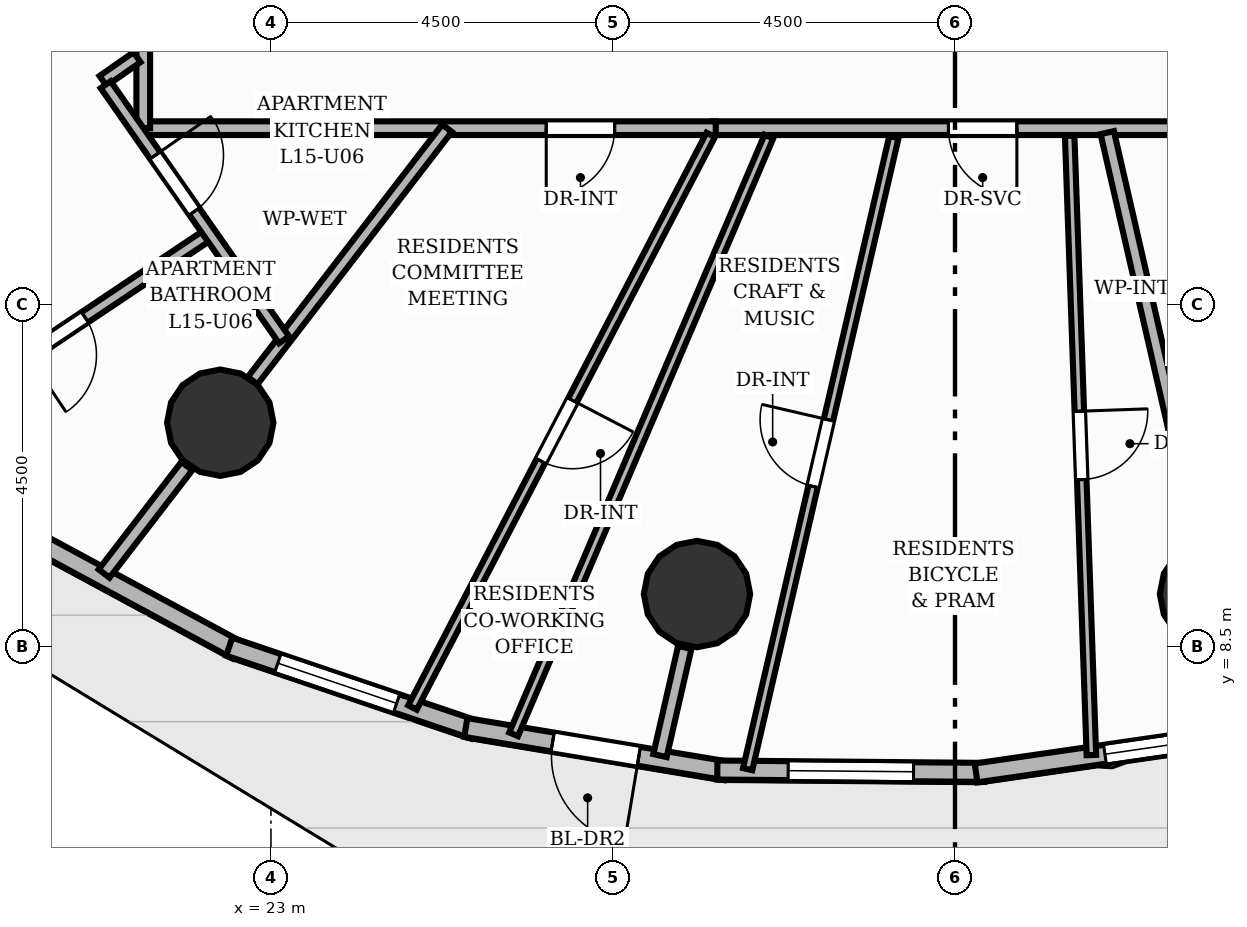
"""IFC4 building model, lengths in metres.
Left out: names, types, materials, properties, quantities, classifications, styles, units other than length and angle.
Written with IfcOpenShell. Run it as: python <this file> out.ifc"""

import sys

from ifc_helpers import new_model, si_unit, direction, frame, frame_2d, origin, origin_2d, place, context, subcontext, project, spatial, rectangle, circle, extrude, element, fill, save


model = new_model("IFC4")
c1 = context("Model", 3, precision=1e-05, world=origin(), true_north=direction((0.0, 1.0)))
c2 = subcontext(c1, "Body", "Model", "MODEL_VIEW")
j1 = project(units=[si_unit("LENGTHUNIT", "METRE"), si_unit("PLANEANGLEUNIT", "RADIAN")], contexts=[c1])
p1 = place(None, origin())
s1 = spatial("IfcSite", under=j1, at=p1, CompositionType="ELEMENT")
p2 = place(p1, origin())
s2 = spatial("IfcBuilding", under=s1, at=p2, CompositionType="ELEMENT")
p3 = place(p2, frame((0.0, 0.0, 53.6)))
s3 = spatial("IfcBuildingStorey", under=s2, at=p3, CompositionType="ELEMENT", Elevation=53.6)
for number, where, z_axis, x_axis in (
    (1, (22.333, 11.445, 0.0), (0.0, 0.0, 1.0), (1.0, 0.0, 0.0)),
    (2, (28.605, 9.19, 0.0), (0.0, 0.0, 1.0), (1.0, 0.0, 0.0)),
    (3, (35.395, 9.19, 0.0), (0.0, 0.0, 1.0), (1.0, 0.0, 0.0)),
):
    element("IfcColumn", number, at=place(p3, frame(where, z_axis=z_axis, x_axis=x_axis)), inside=s3, PredefinedType="COLUMN", context=c2, shape_type="SweptSolid", body=[
        extrude(circle(Radius=0.7, at=origin_2d()), origin(), (0.0, 0.0, 1.0), 3.2),
    ])
p4 = place(p3, frame((22.552, 8.454, 0.0), z_axis=(0.0, 0.0, 1.0), x_axis=(-0.879811992908, 0.475321845843, 0.0)))
e4 = element("IfcWall", 4, at=p4, inside=s3, PredefinedType="SOLIDWALL", context=c2, shape_type="SweptSolid", body=[
    extrude(rectangle(XDim=3.323, YDim=0.25, at=frame_2d((1.661, 0.0))), origin(), (0.0, 0.0, 1.0), 2.96),
])
p5 = place(p3, frame((25.67, 7.407, 0.0), z_axis=(0.0, 0.0, 1.0), x_axis=(-0.947149503871, 0.320792483262, 0.0)))
e5 = element("IfcWall", 5, at=p5, inside=s3, PredefinedType="SOLIDWALL", context=c2, shape_type="SweptSolid", body=[
    extrude(rectangle(XDim=3.399, YDim=0.25, at=frame_2d((1.699, 0.0))), origin(), (0.0, 0.0, 1.0), 2.96),
])
p6 = place(p5, frame((1.074, 0.0, 0.85)))
e6 = element("IfcOpeningElement", 6, at=p6, cuts=e5, PredefinedType="OPENING", context=c2, shape_type="SweptSolid", body=[
    extrude(rectangle(XDim=1.65, YDim=1.55, at=frame_2d((0.825, 0.775))), frame((0.0, 0.135, 0.0), z_axis=(0.0, -1.0, 0.0), x_axis=(1.0, 0.0, 0.0)), (0.0, 0.0, 1.0), 0.27),
])
p7 = place(p3, frame((28.982, 6.865, 0.0), z_axis=(0.0, 0.0, 1.0), x_axis=(-0.986430084323, 0.164181877025, 0.0)))
e7 = element("IfcWall", 7, at=p7, inside=s3, PredefinedType="SOLIDWALL", context=c2, shape_type="SweptSolid", body=[
    extrude(rectangle(XDim=3.465, YDim=0.25, at=frame_2d((1.732, 0.0))), origin(), (0.0, 0.0, 1.0), 2.96),
])
p8 = place(p7, frame((1.157, 0.0, 0.0)))
e8 = element("IfcOpeningElement", 8, at=p8, cuts=e7, PredefinedType="OPENING", context=c2, shape_type="SweptSolid", body=[
    extrude(rectangle(XDim=1.15, YDim=2.01, at=frame_2d((0.575, 1.005))), frame((0.0, 0.135, 0.0), z_axis=(0.0, -1.0, 0.0), x_axis=(1.0, 0.0, 0.0)), (0.0, 0.0, 1.0), 0.27),
])
p9 = place(p3, frame((32.386, 6.844, 0.0), z_axis=(0.0, 0.0, 1.0), x_axis=(-0.999961046076, 0.008826456273, 0.0)))
e9 = element("IfcWall", 9, at=p9, inside=s3, PredefinedType="SOLIDWALL", context=c2, shape_type="SweptSolid", body=[
    extrude(rectangle(XDim=3.513, YDim=0.25, at=frame_2d((1.756, 0.0))), origin(), (0.0, 0.0, 1.0), 2.96),
])
p10 = place(p9, frame((0.931, 0.0, 0.85)))
e10 = element("IfcOpeningElement", 10, at=p10, cuts=e9, PredefinedType="OPENING", context=c2, shape_type="SweptSolid", body=[
    extrude(rectangle(XDim=1.65, YDim=1.55, at=frame_2d((0.825, 0.775))), frame((0.0, 0.135, 0.0), z_axis=(0.0, -1.0, 0.0), x_axis=(1.0, 0.0, 0.0)), (0.0, 0.0, 1.0), 0.27),
])
p11 = place(p3, frame((35.779, 7.344, 0.0), z_axis=(0.0, 0.0, 1.0), x_axis=(-0.989638017979, -0.143584795051, 0.0)))
e11 = element("IfcWall", 11, at=p11, inside=s3, PredefinedType="SOLIDWALL", context=c2, shape_type="SweptSolid", body=[
    extrude(rectangle(XDim=3.538, YDim=0.25, at=frame_2d((1.769, 0.0))), origin(), (0.0, 0.0, 1.0), 2.96),
])
p12 = place(p11, frame((0.175, 0.0, 0.85)))
e12 = element("IfcOpeningElement", 12, at=p12, cuts=e11, PredefinedType="OPENING", context=c2, shape_type="SweptSolid", body=[
    extrude(rectangle(XDim=1.65, YDim=1.29, at=frame_2d((0.825, 0.645))), frame((0.0, 0.135, 0.0), z_axis=(0.0, -1.0, 0.0), x_axis=(1.0, 0.0, 0.0)), (0.0, 0.0, 1.0), 0.27),
])
p13 = place(p3, frame((21.894, 10.874, 0.0), z_axis=(0.0, 0.0, 1.0), x_axis=(-0.61002145357, -0.792384897752, 0.0)))
e13 = element("IfcWall", 13, at=p13, inside=s3, PredefinedType="PARTITIONING", context=c2, shape_type="SweptSolid", body=[
    extrude(rectangle(XDim=1.785, YDim=0.18, at=frame_2d((0.892, 0.0))), origin(), (0.0, 0.0, 1.0), 2.178),
])
p14 = place(p3, frame((28.445, 8.488, 0.0), z_axis=(0.0, 0.0, 1.0), x_axis=(-0.223491959946, -0.974705772959, 0.0)))
e14 = element("IfcWall", 14, at=p14, inside=s3, PredefinedType="PARTITIONING", context=c2, shape_type="SweptSolid", body=[
    extrude(rectangle(XDim=1.46, YDim=0.18, at=frame_2d((0.73, 0.0))), origin(), (0.0, 0.0, 1.0), 2.178),
])
p15 = place(p3, frame((42.68, 15.32, 0.0), z_axis=(0.0, 0.0, 1.0), x_axis=(-1.0, 0.0, 0.0)))
e15 = element("IfcWall", 15, at=p15, inside=s3, PredefinedType="PARTITIONING", context=c2, shape_type="SweptSolid", body=[
    extrude(rectangle(XDim=13.87, YDim=0.18, at=frame_2d((6.935, 0.0))), origin(), (0.0, 0.0, 1.0), 2.955),
])
p16 = place(p15, frame((9.866, 0.0, 0.0)))
e16 = element("IfcOpeningElement", 16, at=p16, cuts=e15, PredefinedType="OPENING", context=c2, shape_type="SweptSolid", body=[
    extrude(rectangle(XDim=0.9, YDim=2.1, at=frame_2d((0.45, 1.05))), frame((0.0, 0.1, 0.0), z_axis=(0.0, -1.0, 0.0), x_axis=(1.0, 0.0, 0.0)), (0.0, 0.0, 1.0), 0.2),
])
p17 = place(p3, frame((28.852, 15.32, 0.0), z_axis=(0.0, 0.0, 1.0), x_axis=(-1.0, 0.0, 0.0)))
e17 = element("IfcWall", 17, at=p17, inside=s3, PredefinedType="PARTITIONING", context=c2, shape_type="SweptSolid", body=[
    extrude(rectangle(XDim=7.532, YDim=0.18, at=frame_2d((3.766, 0.0))), origin(), (0.0, 0.0, 1.0), 2.955),
])
p18 = place(p17, frame((1.33, 0.0, 0.0)))
e18 = element("IfcOpeningElement", 18, at=p18, cuts=e17, PredefinedType="OPENING", context=c2, shape_type="SweptSolid", body=[
    extrude(rectangle(XDim=0.9, YDim=2.1, at=frame_2d((0.45, 1.05))), frame((0.0, 0.1, 0.0), z_axis=(0.0, -1.0, 0.0), x_axis=(1.0, 0.0, 0.0)), (0.0, 0.0, 1.0), 0.2),
])
p19 = place(p3, frame((21.32, 15.32, 0.0), z_axis=(0.0, 0.0, 1.0), x_axis=(0.0, 1.0, 0.0)))
e19 = element("IfcWall", 19, at=p19, inside=s3, PredefinedType="PARTITIONING", context=c2, shape_type="SweptSolid", body=[
    extrude(rectangle(XDim=4.947, YDim=0.18, at=frame_2d((2.474, 0.0))), origin(), (0.0, 0.0, 1.0), 2.955),
])
p20 = place(p19, frame((2.432, 0.0, 0.0)))
e20 = element("IfcOpeningElement", 20, at=p20, cuts=e19, PredefinedType="OPENING", context=c2, shape_type="SweptSolid", body=[
    extrude(rectangle(XDim=1.05, YDim=2.15, at=frame_2d((0.525, 1.075))), frame((0.0, 0.1, 0.0), z_axis=(0.0, -1.0, 0.0), x_axis=(1.0, 0.0, 0.0)), (0.0, 0.0, 1.0), 0.2),
])
p21 = place(p3, frame((33.509, 15.22, 0.0), z_axis=(0.0, 0.0, 1.0), x_axis=(0.035033610305, -0.999386134659, 0.0)))
e21 = element("IfcWall", 21, at=p21, inside=s3, PredefinedType="PARTITIONING", context=c2, shape_type="SweptSolid", body=[
    extrude(rectangle(XDim=8.154, YDim=0.125, at=frame_2d((4.077, 0.0))), origin(), (0.0, 0.0, 1.0), 2.955),
])
p22 = place(p21, frame((3.627, 0.0, 0.0)))
e22 = element("IfcOpeningElement", 22, at=p22, cuts=e21, PredefinedType="OPENING", context=c2, shape_type="SweptSolid", body=[
    extrude(rectangle(XDim=0.9, YDim=2.1, at=frame_2d((0.45, 1.05))), frame((0.0, 0.073, 0.0), z_axis=(0.0, -1.0, 0.0), x_axis=(1.0, 0.0, 0.0)), (0.0, 0.0, 1.0), 0.145),
])
p23 = place(p3, frame((29.272, 6.886, 0.0), z_axis=(0.0, 0.0, 1.0), x_axis=(0.225419243566, 0.974261856294, 0.0)))
e23 = element("IfcWall", 23, at=p23, inside=s3, PredefinedType="PARTITIONING", context=c2, shape_type="SweptSolid", body=[
    extrude(rectangle(XDim=8.537, YDim=0.125, at=frame_2d((4.268, 0.0))), origin(), (0.0, 0.0, 1.0), 2.641),
])
p24 = place(p23, frame((3.818, 0.0, 0.0)))
e24 = element("IfcOpeningElement", 24, at=p24, cuts=e23, PredefinedType="OPENING", context=c2, shape_type="SweptSolid", body=[
    extrude(rectangle(XDim=0.9, YDim=2.1, at=frame_2d((0.45, 1.05))), frame((0.0, 0.073, 0.0), z_axis=(0.0, -1.0, 0.0), x_axis=(1.0, 0.0, 0.0)), (0.0, 0.0, 1.0), 0.145),
])
p25 = place(p3, frame((28.786, 15.231, 0.0), z_axis=(0.0, 0.0, 1.0), x_axis=(-0.461913695099, -0.886924877473, 0.0)))
e25 = element("IfcWall", 25, at=p25, inside=s3, PredefinedType="PARTITIONING", context=c2, shape_type="SweptSolid", body=[
    extrude(rectangle(XDim=8.495, YDim=0.125, at=frame_2d((4.247, 0.0))), origin(), (0.0, 0.0, 1.0), 2.641),
])
p26 = place(p25, frame((3.938, 0.0, 0.0)))
e26 = element("IfcOpeningElement", 26, at=p26, cuts=e25, PredefinedType="OPENING", context=c2, shape_type="SweptSolid", body=[
    extrude(rectangle(XDim=0.9, YDim=2.1, at=frame_2d((0.45, 1.05))), frame((0.0, 0.073, 0.0), z_axis=(0.0, -1.0, 0.0), x_axis=(1.0, 0.0, 0.0)), (0.0, 0.0, 1.0), 0.145),
])
p27 = place(p3, frame((22.759, 11.998, 0.0), z_axis=(0.0, 0.0, 1.0), x_axis=(0.60996965366, 0.792424773473, 0.0)))
e27 = element("IfcWall", 27, at=p27, inside=s3, PredefinedType="PLUMBINGWALL", context=c2, shape_type="SweptSolid", body=[
    extrude(rectangle(XDim=4.192, YDim=0.16, at=frame_2d((2.096, 0.0))), origin(), (0.0, 0.0, 1.0), 2.178),
])
p28 = place(p3, frame((34.003, 15.261, 0.0), z_axis=(0.0, 0.0, 1.0), x_axis=(0.22340578764, -0.974725527546, 0.0)))
e28 = element("IfcWall", 28, at=p28, inside=s3, PredefinedType="PARTITIONING", context=c2, shape_type="SweptSolid", body=[
    extrude(rectangle(XDim=5.545, YDim=0.18, at=frame_2d((2.772, 0.0))), origin(), (0.0, 0.0, 1.0), 2.178),
])
p29 = place(p3, frame((26.193, 7.345, 0.0), z_axis=(0.0, 0.0, 1.0), x_axis=(0.392702721524, 0.919665467715, 0.0)))
e29 = element("IfcWall", 29, at=p29, inside=s3, PredefinedType="PARTITIONING", context=c2, shape_type="SweptSolid", body=[
    extrude(rectangle(XDim=8.552, YDim=0.125, at=frame_2d((4.276, 0.0))), origin(), (0.0, 0.0, 1.0), 2.955),
])
p30 = place(p3, frame((22.195, 13.933, 0.0), z_axis=(0.0, 0.0, 1.0), x_axis=(-0.831027380647, -0.556231509908, 0.0)))
e30 = element("IfcWall", 30, at=p30, inside=s3, PredefinedType="PLUMBINGWALL", context=c2, shape_type="SweptSolid", body=[
    extrude(rectangle(XDim=4.854, YDim=0.16, at=frame_2d((2.427, 0.0))), origin(), (0.0, 0.0, 1.0), 2.641),
])
p31 = place(p30, frame((1.977, 0.0, 0.0)))
e31 = element("IfcOpeningElement", 31, at=p31, cuts=e30, PredefinedType="OPENING", context=c2, shape_type="SweptSolid", body=[
    extrude(rectangle(XDim=0.9, YDim=2.1, at=frame_2d((0.45, 1.05))), frame((0.0, 0.09, 0.0), z_axis=(0.0, -1.0, 0.0), x_axis=(1.0, 0.0, 0.0)), (0.0, 0.0, 1.0), 0.18),
])
p32 = place(p3, frame((21.238, 16.254, 0.0), z_axis=(0.0, 0.0, 1.0), x_axis=(-0.819589255208, -0.572951527398, 0.0)))
e32 = element("IfcWall", 32, at=p32, inside=s3, PredefinedType="PLUMBINGWALL", context=c2, shape_type="SweptSolid", body=[
    extrude(rectangle(XDim=0.545, YDim=0.16, at=frame_2d((0.273, 0.0))), origin(), (0.0, 0.0, 1.0), 2.955),
])
p33 = place(p3, frame((20.825, 15.893, 0.0), z_axis=(0.0, 0.0, 1.0), x_axis=(0.572966263624, -0.819578953334, 0.0)))
e33 = element("IfcWall", 33, at=p33, inside=s3, PredefinedType="PLUMBINGWALL", context=c2, shape_type="SweptSolid", body=[
    extrude(rectangle(XDim=4.096, YDim=0.16, at=frame_2d((2.048, 0.0))), origin(), (0.0, 0.0, 1.0), 2.955),
])
p34 = place(p33, frame((1.135, 0.0, 0.0)))
e34 = element("IfcOpeningElement", 34, at=p34, cuts=e33, PredefinedType="OPENING", context=c2, shape_type="SweptSolid", body=[
    extrude(rectangle(XDim=0.9, YDim=2.1, at=frame_2d((0.45, 1.05))), frame((0.0, 0.09, 0.0), z_axis=(0.0, -1.0, 0.0), x_axis=(1.0, 0.0, 0.0)), (0.0, 0.0, 1.0), 0.18),
])
p35 = place(p8, origin())
e35 = element("IfcDoor", 35, at=p35, inside=s3, OperationType="SINGLE_SWING_LEFT", PredefinedType="DOOR", context=c2, shape_type="SweptSolid", body=[
    extrude(rectangle(XDim=1.15, YDim=2.01, at=frame_2d((0.575, 1.005))), frame((0.0, 0.025, 0.0), z_axis=(0.0, -1.0, 0.0), x_axis=(1.0, 0.0, 0.0)), (0.0, 0.0, 1.0), 0.05),
])
fill(e8, e35)
p36 = place(p6, origin())
e36 = element("IfcWindow", 36, at=p36, inside=s3, PartitioningType="SINGLE_PANEL", PredefinedType="WINDOW", context=c2, shape_type="SweptSolid", body=[
    extrude(rectangle(XDim=1.65, YDim=1.55, at=frame_2d((0.825, 0.775))), frame((0.0, 0.03, 0.0), z_axis=(0.0, -1.0, 0.0), x_axis=(1.0, 0.0, 0.0)), (0.0, 0.0, 1.0), 0.06),
])
fill(e6, e36)
p37 = place(p10, origin())
e37 = element("IfcWindow", 37, at=p37, inside=s3, PartitioningType="SINGLE_PANEL", PredefinedType="WINDOW", context=c2, shape_type="SweptSolid", body=[
    extrude(rectangle(XDim=1.65, YDim=1.55, at=frame_2d((0.825, 0.775))), frame((0.0, 0.03, 0.0), z_axis=(0.0, -1.0, 0.0), x_axis=(1.0, 0.0, 0.0)), (0.0, 0.0, 1.0), 0.06),
])
fill(e10, e37)
p38 = place(p12, origin())
e38 = element("IfcWindow", 38, at=p38, inside=s3, PartitioningType="SINGLE_PANEL", PredefinedType="WINDOW", context=c2, shape_type="SweptSolid", body=[
    extrude(rectangle(XDim=1.65, YDim=1.29, at=frame_2d((0.825, 0.645))), frame((0.0, 0.03, 0.0), z_axis=(0.0, -1.0, 0.0), x_axis=(1.0, 0.0, 0.0)), (0.0, 0.0, 1.0), 0.06),
])
fill(e12, e38)
p39 = place(p16, origin())
e39 = element("IfcDoor", 39, at=p39, inside=s3, OperationType="SINGLE_SWING_LEFT", PredefinedType="DOOR", context=c2, shape_type="SweptSolid", body=[
    extrude(rectangle(XDim=0.9, YDim=2.1, at=frame_2d((0.45, 1.05))), frame((0.0, 0.025, 0.0), z_axis=(0.0, -1.0, 0.0), x_axis=(1.0, 0.0, 0.0)), (0.0, 0.0, 1.0), 0.05),
])
fill(e16, e39)
p40 = place(p18, origin())
e40 = element("IfcDoor", 40, at=p40, inside=s3, OperationType="SINGLE_SWING_RIGHT", PredefinedType="DOOR", context=c2, shape_type="SweptSolid", body=[
    extrude(rectangle(XDim=0.9, YDim=2.1, at=frame_2d((0.45, 1.05))), frame((0.0, 0.025, 0.0), z_axis=(0.0, -1.0, 0.0), x_axis=(1.0, 0.0, 0.0)), (0.0, 0.0, 1.0), 0.05),
])
fill(e18, e40)
p41 = place(p22, origin())
e41 = element("IfcDoor", 41, at=p41, inside=s3, OperationType="SINGLE_SWING_LEFT", PredefinedType="DOOR", context=c2, shape_type="SweptSolid", body=[
    extrude(rectangle(XDim=0.9, YDim=2.1, at=frame_2d((0.45, 1.05))), frame((0.0, 0.025, 0.0), z_axis=(0.0, -1.0, 0.0), x_axis=(1.0, 0.0, 0.0)), (0.0, 0.0, 1.0), 0.05),
])
fill(e22, e41)
p42 = place(p24, origin())
e42 = element("IfcDoor", 42, at=p42, inside=s3, OperationType="SINGLE_SWING_RIGHT", PredefinedType="DOOR", context=c2, shape_type="SweptSolid", body=[
    extrude(rectangle(XDim=0.9, YDim=2.1, at=frame_2d((0.45, 1.05))), frame((0.0, 0.025, 0.0), z_axis=(0.0, -1.0, 0.0), x_axis=(1.0, 0.0, 0.0)), (0.0, 0.0, 1.0), 0.05),
])
fill(e24, e42)
p43 = place(p26, origin())
e43 = element("IfcDoor", 43, at=p43, inside=s3, OperationType="SINGLE_SWING_LEFT", PredefinedType="DOOR", context=c2, shape_type="SweptSolid", body=[
    extrude(rectangle(XDim=0.9, YDim=2.1, at=frame_2d((0.45, 1.05))), frame((0.0, 0.025, 0.0), z_axis=(0.0, -1.0, 0.0), x_axis=(1.0, 0.0, 0.0)), (0.0, 0.0, 1.0), 0.05),
])
fill(e26, e43)
p44 = place(p31, origin())
e44 = element("IfcDoor", 44, at=p44, inside=s3, OperationType="SINGLE_SWING_RIGHT", PredefinedType="DOOR", context=c2, shape_type="SweptSolid", body=[
    extrude(rectangle(XDim=0.9, YDim=2.1, at=frame_2d((0.45, 1.05))), frame((0.0, 0.025, 0.0), z_axis=(0.0, -1.0, 0.0), x_axis=(1.0, 0.0, 0.0)), (0.0, 0.0, 1.0), 0.05),
])
fill(e31, e44)
p45 = place(p34, origin())
e45 = element("IfcDoor", 45, at=p45, inside=s3, OperationType="SINGLE_SWING_LEFT", PredefinedType="DOOR", context=c2, shape_type="SweptSolid", body=[
    extrude(rectangle(XDim=0.9, YDim=2.1, at=frame_2d((0.45, 1.05))), frame((0.0, 0.025, 0.0), z_axis=(0.0, -1.0, 0.0), x_axis=(1.0, 0.0, 0.0)), (0.0, 0.0, 1.0), 0.05),
])
fill(e34, e45)
save(model, sys.argv[1])
